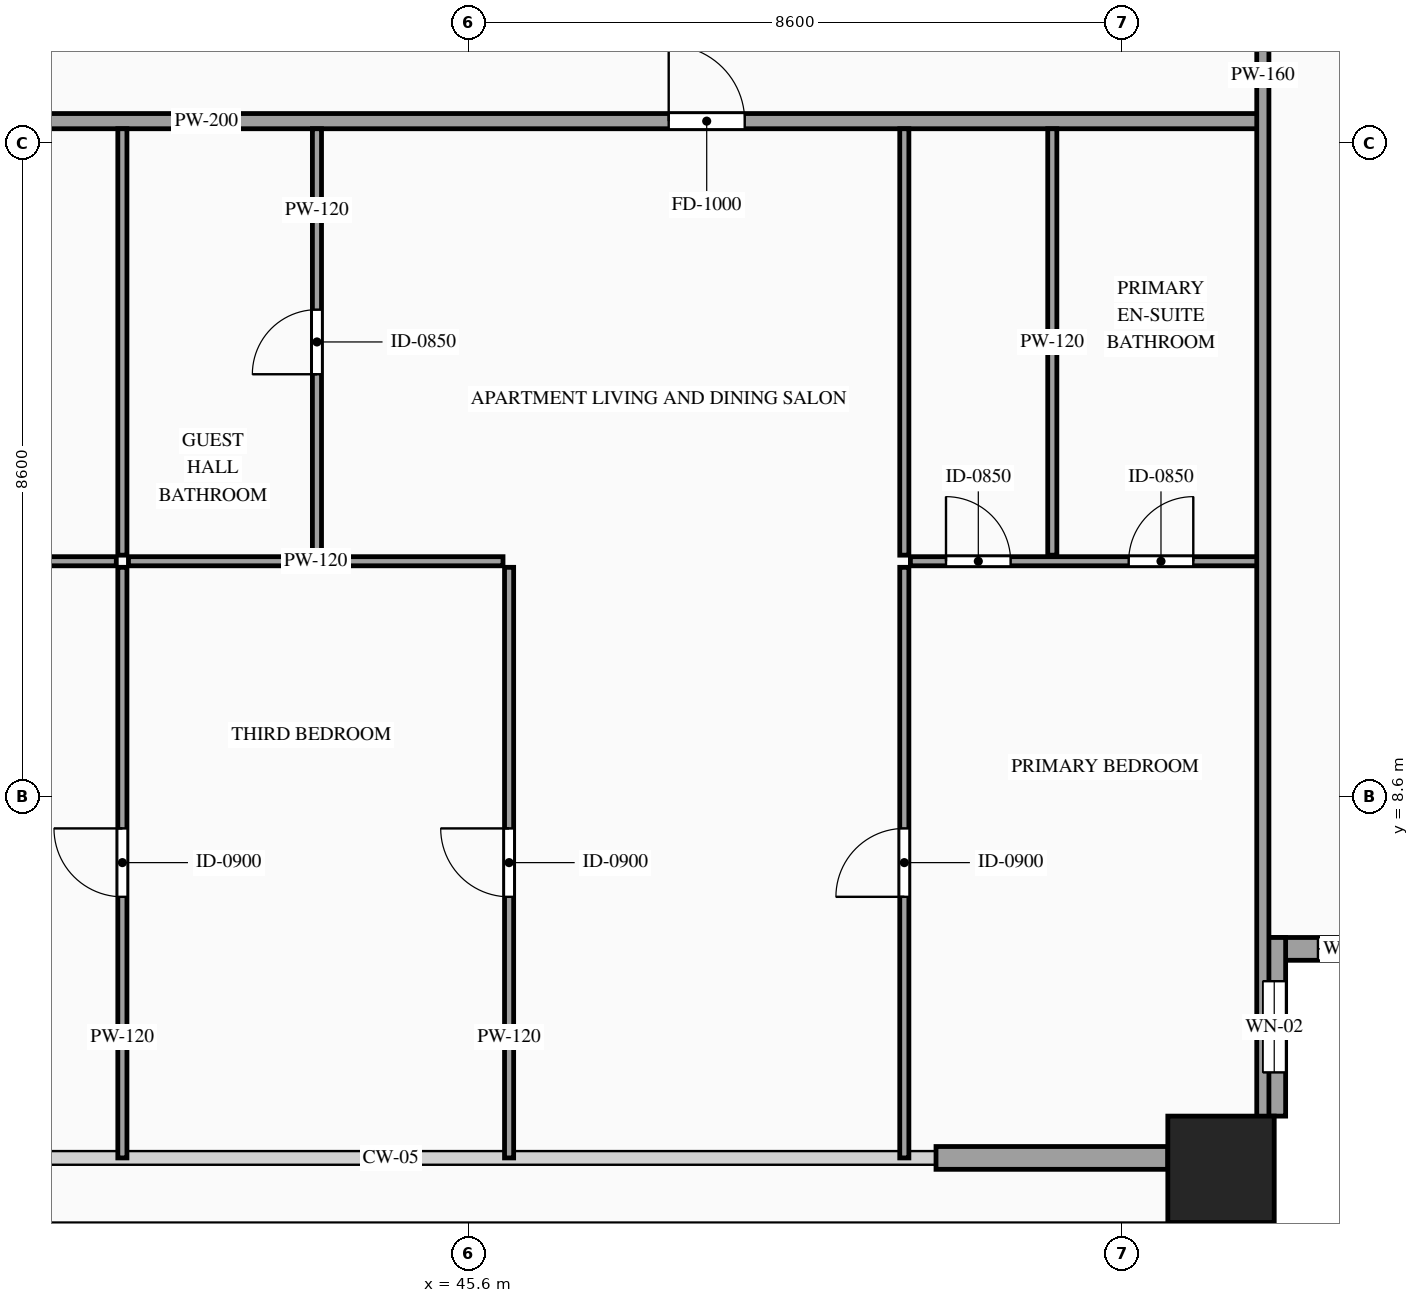
"""IFC4 building model, lengths in metres.
Left out: names, types, materials, properties, quantities, classifications, styles, units other than length and angle.
Written with IfcOpenShell. Run it as: python <this file> out.ifc"""

import sys

from ifc_helpers import new_model, si_unit, direction, frame, frame_2d, origin, origin_2d, place, context, subcontext, project, spatial, rectangle, hollow_rectangle, extrude, source, transform, mapped, element, fill, save


model = new_model("IFC4")
c1 = context("Model", 3, precision=1e-05, world=origin(), true_north=direction((0.0, 1.0)))
c2 = subcontext(c1, "Body", "Model", "MODEL_VIEW")
j1 = project(units=[si_unit("LENGTHUNIT", "METRE"), si_unit("PLANEANGLEUNIT", "RADIAN")], contexts=[c1])
p1 = place(None, origin())
s1 = spatial("IfcSite", under=j1, at=p1, CompositionType="ELEMENT")
p2 = place(p1, origin())
s2 = spatial("IfcBuilding", under=s1, at=p2, CompositionType="ELEMENT")
p3 = place(p2, frame((0.0, 0.0, 195.0)))
s3 = spatial("IfcBuildingStorey", under=s2, at=p3, CompositionType="ELEMENT", Elevation=195.0)
m1 = source(origin(), c2, "Body", "SweptSolid", [
    extrude(hollow_rectangle(XDim=1.4, YDim=1.4, WallThickness=0.06, at=origin_2d()), origin(), (0.0, 0.0, 1.0), 3.5),
])
p4 = place(p3, frame((55.5, 3.7, 0.0), z_axis=(0.0, 0.0, 1.0), x_axis=(1.0, 0.0, 0.0)))
e1 = element("IfcColumn", 1, at=p4, inside=s3, PredefinedType="COLUMN", context=c2, shape_type="MappedRepresentation", body=[
    mapped(m1, transform((0.0, 0.0, 0.0), scale=1.0)),
])
p5 = place(p3, frame((56.05, 6.6, 0.0), z_axis=(0.0, 0.0, 1.0), x_axis=(1.0, 0.0, 0.0)))
e2 = element("IfcWall", 2, at=p5, inside=s3, PredefinedType="SOLIDWALL", context=c2, shape_type="SweptSolid", body=[
    extrude(rectangle(XDim=2.35, YDim=0.3, at=frame_2d((1.175, 0.0))), origin(), (0.0, 0.0, 1.0), 3.28),
])
p6 = place(p5, frame((0.725, 0.0, 0.85)))
e3 = element("IfcOpeningElement", 3, at=p6, cuts=e2, PredefinedType="OPENING", context=c2, shape_type="SweptSolid", body=[
    extrude(rectangle(XDim=0.9, YDim=1.5, at=frame_2d((0.45, 0.75))), frame((0.0, 0.165, 0.0), z_axis=(0.0, -1.0, 0.0), x_axis=(1.0, 0.0, 0.0)), (0.0, 0.0, 1.0), 0.33),
])
p7 = place(p3, frame((56.2, 4.4, 0.0), z_axis=(0.0, 0.0, 1.0), x_axis=(0.0, 1.0, 0.0)))
e4 = element("IfcWall", 4, at=p7, inside=s3, PredefinedType="SOLIDWALL", context=c2, shape_type="SweptSolid", body=[
    extrude(rectangle(XDim=2.35, YDim=0.3, at=frame_2d((1.175, 0.0))), origin(), (0.0, 0.0, 1.0), 3.28),
])
p8 = place(p7, frame((0.575, 0.0, 0.85)))
e5 = element("IfcOpeningElement", 5, at=p8, cuts=e4, PredefinedType="OPENING", context=c2, shape_type="SweptSolid", body=[
    extrude(rectangle(XDim=1.2, YDim=2.1, at=frame_2d((0.6, 1.05))), frame((0.0, 0.165, 0.0), z_axis=(0.0, -1.0, 0.0), x_axis=(1.0, 0.0, 0.0)), (0.0, 0.0, 1.0), 0.33),
])
m2 = source(origin(), c2, "Body", "SweptSolid", [
    extrude(rectangle(XDim=3.05, YDim=0.3, at=frame_2d((1.525, 0.0))), origin(), (0.0, 0.0, 1.0), 2.835),
])
p9 = place(p3, frame((51.75, 3.85, 0.0), z_axis=(0.0, 0.0, 1.0), x_axis=(1.0, 0.0, 0.0)))
e6 = element("IfcWall", 6, at=p9, inside=s3, PredefinedType="SOLIDWALL", context=c2, shape_type="MappedRepresentation", body=[
    mapped(m2, transform((0.0, 0.0, 0.0), scale=1.0)),
])
p10 = place(p3, frame((36.318, 17.49, 0.0), z_axis=(0.0, 0.0, 1.0), x_axis=(1.0, 0.0, 0.0)))
e7 = element("IfcWall", 7, at=p10, inside=s3, PredefinedType="PARTITIONING", context=c2, shape_type="SweptSolid", body=[
    extrude(rectangle(XDim=19.742, YDim=0.2, at=frame_2d((9.871, 0.0))), origin(), (0.0, 0.0, 1.0), 3.28),
])
p11 = place(p10, frame((11.915, 0.0, 0.0)))
e8 = element("IfcOpeningElement", 8, at=p11, cuts=e7, PredefinedType="OPENING", context=c2, shape_type="SweptSolid", body=[
    extrude(rectangle(XDim=1.0, YDim=2.2, at=frame_2d((0.5, 1.1))), frame((0.0, 0.115, 0.0), z_axis=(0.0, -1.0, 0.0), x_axis=(1.0, 0.0, 0.0)), (0.0, 0.0, 1.0), 0.23),
])
p12 = place(p3, frame((36.318, 11.7, 0.0), z_axis=(0.0, 0.0, 1.0), x_axis=(1.0, 0.0, 0.0)))
e9 = element("IfcWall", 9, at=p12, inside=s3, PredefinedType="PARTITIONING", context=c2, shape_type="SweptSolid", body=[
    extrude(rectangle(XDim=4.647, YDim=0.12, at=frame_2d((2.323, 0.0))), origin(), (0.0, 0.0, 1.0), 2.875),
])
p13 = place(p12, frame((1.898, 0.0, 0.0)))
e10 = element("IfcOpeningElement", 10, at=p13, cuts=e9, PredefinedType="OPENING", context=c2, shape_type="SweptSolid", body=[
    extrude(rectangle(XDim=0.85, YDim=2.1, at=frame_2d((0.425, 1.05))), frame((0.0, 0.075, 0.0), z_axis=(0.0, -1.0, 0.0), x_axis=(1.0, 0.0, 0.0)), (0.0, 0.0, 1.0), 0.15),
])
m3 = source(origin(), c2, "Body", "SweptSolid", [
    extrude(rectangle(XDim=5.61, YDim=0.12, at=frame_2d((2.805, 0.0))), origin(), (0.0, 0.0, 1.0), 3.28),
])
p14 = place(p3, frame((41.045, 11.78, 0.0), z_axis=(0.0, 0.0, 1.0), x_axis=(0.0, 1.0, 0.0)))
e11 = element("IfcWall", 11, at=p14, inside=s3, PredefinedType="PARTITIONING", context=c2, shape_type="MappedRepresentation", body=[
    mapped(m3, transform((0.0, 0.0, 0.0), scale=1.0)),
])
p15 = place(p3, frame((43.605, 11.78, 0.0), z_axis=(0.0, 0.0, 1.0), x_axis=(0.0, 1.0, 0.0)))
e12 = element("IfcWall", 12, at=p15, inside=s3, PredefinedType="PARTITIONING", context=c2, shape_type="SweptSolid", body=[
    extrude(rectangle(XDim=5.61, YDim=0.12, at=frame_2d((2.805, 0.0))), origin(), (0.0, 0.0, 1.0), 3.28),
])
p16 = place(p15, frame((2.38, 0.0, 0.0)))
e13 = element("IfcOpeningElement", 13, at=p16, cuts=e12, PredefinedType="OPENING", context=c2, shape_type="SweptSolid", body=[
    extrude(rectangle(XDim=0.85, YDim=2.1, at=frame_2d((0.425, 1.05))), frame((0.0, 0.075, 0.0), z_axis=(0.0, -1.0, 0.0), x_axis=(1.0, 0.0, 0.0)), (0.0, 0.0, 1.0), 0.15),
])
for number, where, z_axis, x_axis in (
    (14, (53.28, 11.78, 0.0), (0.0, 0.0, 1.0), (0.0, 1.0, 0.0)),
    (15, (51.333, 11.78, 0.0), (0.0, 0.0, 1.0), (0.0, 1.0, 0.0)),
):
    element("IfcWall", number, at=place(p3, frame(where, z_axis=z_axis, x_axis=x_axis)), inside=s3, PredefinedType="PARTITIONING", context=c2, shape_type="MappedRepresentation", body=[
        mapped(m3, transform((0.0, 0.0, 0.0), scale=1.0)),
    ])
p17 = place(p3, frame((41.045, 3.85, 0.0), z_axis=(0.0, 0.0, 1.0), x_axis=(0.0, 1.0, 0.0)))
e16 = element("IfcWall", 16, at=p17, inside=s3, PredefinedType="PARTITIONING", context=c2, shape_type="SweptSolid", body=[
    extrude(rectangle(XDim=7.77, YDim=0.12, at=frame_2d((3.885, 0.0))), origin(), (0.0, 0.0, 1.0), 3.28),
])
p18 = place(p17, frame((3.435, 0.0, 0.0)))
e17 = element("IfcOpeningElement", 17, at=p18, cuts=e16, PredefinedType="OPENING", context=c2, shape_type="SweptSolid", body=[
    extrude(rectangle(XDim=0.9, YDim=2.15, at=frame_2d((0.45, 1.075))), frame((0.0, 0.075, 0.0), z_axis=(0.0, -1.0, 0.0), x_axis=(1.0, 0.0, 0.0)), (0.0, 0.0, 1.0), 0.15),
])
p19 = place(p3, frame((51.413, 11.7, 0.0), z_axis=(0.0, 0.0, 1.0), x_axis=(1.0, 0.0, 0.0)))
e18 = element("IfcWall", 18, at=p19, inside=s3, PredefinedType="PARTITIONING", context=c2, shape_type="SweptSolid", body=[
    extrude(rectangle(XDim=4.647, YDim=0.12, at=frame_2d((2.323, 0.0))), origin(), (0.0, 0.0, 1.0), 3.28),
])
p20 = place(p19, frame((2.872, 0.0, 0.0)))
e19 = element("IfcOpeningElement", 19, at=p20, cuts=e18, PredefinedType="OPENING", context=c2, shape_type="SweptSolid", body=[
    extrude(rectangle(XDim=0.85, YDim=2.1, at=frame_2d((0.425, 1.05))), frame((0.0, 0.075, 0.0), z_axis=(0.0, -1.0, 0.0), x_axis=(1.0, 0.0, 0.0)), (0.0, 0.0, 1.0), 0.15),
])
p21 = place(p19, frame((0.469, 0.0, 0.0)))
e20 = element("IfcOpeningElement", 20, at=p21, cuts=e18, PredefinedType="OPENING", context=c2, shape_type="SweptSolid", body=[
    extrude(rectangle(XDim=0.85, YDim=2.1, at=frame_2d((0.425, 1.05))), frame((0.0, 0.075, 0.0), z_axis=(0.0, -1.0, 0.0), x_axis=(1.0, 0.0, 0.0)), (0.0, 0.0, 1.0), 0.15),
])
p22 = place(p3, frame((51.333, 3.85, 0.0), z_axis=(0.0, 0.0, 1.0), x_axis=(0.0, 1.0, 0.0)))
e21 = element("IfcWall", 21, at=p22, inside=s3, PredefinedType="PARTITIONING", context=c2, shape_type="SweptSolid", body=[
    extrude(rectangle(XDim=7.77, YDim=0.12, at=frame_2d((3.885, 0.0))), origin(), (0.0, 0.0, 1.0), 3.28),
])
p23 = place(p22, frame((3.435, 0.0, 0.0)))
e22 = element("IfcOpeningElement", 22, at=p23, cuts=e21, PredefinedType="OPENING", context=c2, shape_type="SweptSolid", body=[
    extrude(rectangle(XDim=0.9, YDim=2.15, at=frame_2d((0.45, 1.075))), frame((0.0, 0.075, 0.0), z_axis=(0.0, -1.0, 0.0), x_axis=(1.0, 0.0, 0.0)), (0.0, 0.0, 1.0), 0.15),
])
m4 = source(origin(), c2, "Body", "SweptSolid", [
    extrude(rectangle(XDim=4.928, YDim=0.12, at=frame_2d((2.464, 0.0))), origin(), (0.0, 0.0, 1.0), 2.875),
])
p24 = place(p3, frame((41.125, 11.7, 0.0), z_axis=(0.0, 0.0, 1.0), x_axis=(1.0, 0.0, 0.0)))
e23 = element("IfcWall", 23, at=p24, inside=s3, PredefinedType="PARTITIONING", context=c2, shape_type="MappedRepresentation", body=[
    mapped(m4, transform((0.0, 0.0, 0.0), scale=1.0)),
])
p25 = place(p3, frame((46.133, 3.85, 0.0), z_axis=(0.0, 0.0, 1.0), x_axis=(0.0, 1.0, 0.0)))
e24 = element("IfcWall", 24, at=p25, inside=s3, PredefinedType="PARTITIONING", context=c2, shape_type="SweptSolid", body=[
    extrude(rectangle(XDim=7.77, YDim=0.12, at=frame_2d((3.885, 0.0))), origin(), (0.0, 0.0, 1.0), 3.28),
])
p26 = place(p25, frame((3.435, 0.0, 0.0)))
e25 = element("IfcOpeningElement", 25, at=p26, cuts=e24, PredefinedType="OPENING", context=c2, shape_type="SweptSolid", body=[
    extrude(rectangle(XDim=0.9, YDim=2.15, at=frame_2d((0.45, 1.075))), frame((0.0, 0.075, 0.0), z_axis=(0.0, -1.0, 0.0), x_axis=(1.0, 0.0, 0.0)), (0.0, 0.0, 1.0), 0.15),
])
m5 = source(origin(), c2, "Body", "SweptSolid", [
    extrude(rectangle(XDim=28.19, YDim=0.16, at=frame_2d((14.095, 0.0))), origin(), (0.0, 0.0, 1.0), 3.28),
])
p27 = place(p3, frame((56.05, 4.0, 0.0), z_axis=(0.0, 0.0, 1.0), x_axis=(0.0, 1.0, 0.0)))
e26 = element("IfcWall", 26, at=p27, inside=s3, PredefinedType="PARTITIONING", context=c2, shape_type="MappedRepresentation", body=[
    mapped(m5, transform((0.0, 0.0, 0.0), scale=1.0)),
])
m6 = source(origin(), c2, "Body", "SweptSolid", [
    extrude(rectangle(XDim=0.9, YDim=1.5, at=frame_2d((0.45, 0.75))), frame((0.0, 0.03, 0.0), z_axis=(0.0, -1.0, 0.0), x_axis=(1.0, 0.0, 0.0)), (0.0, 0.0, 1.0), 0.06),
])
p28 = place(p6, origin())
e27 = element("IfcWindow", 27, at=p28, inside=s3, PartitioningType="SINGLE_PANEL", PredefinedType="WINDOW", context=c2, shape_type="MappedRepresentation", body=[
    mapped(m6, transform((0.0, 0.0, 0.0), scale=1.0)),
])
fill(e3, e27)
m7 = source(origin(), c2, "Body", "SweptSolid", [
    extrude(rectangle(XDim=1.2, YDim=2.1, at=frame_2d((0.6, 1.05))), frame((0.0, 0.03, 0.0), z_axis=(0.0, -1.0, 0.0), x_axis=(1.0, 0.0, 0.0)), (0.0, 0.0, 1.0), 0.06),
])
p29 = place(p8, origin())
e28 = element("IfcWindow", 28, at=p29, inside=s3, PartitioningType="SINGLE_PANEL", PredefinedType="WINDOW", context=c2, shape_type="MappedRepresentation", body=[
    mapped(m7, transform((0.0, 0.0, 0.0), scale=1.0)),
])
fill(e5, e28)
m8 = source(origin(), c2, "Body", "SweptSolid", [
    extrude(rectangle(XDim=1.0, YDim=2.2, at=frame_2d((0.5, 1.1))), frame((0.0, 0.025, 0.0), z_axis=(0.0, -1.0, 0.0), x_axis=(1.0, 0.0, 0.0)), (0.0, 0.0, 1.0), 0.05),
])
p30 = place(p11, origin())
e29 = element("IfcDoor", 29, at=p30, inside=s3, OperationType="SINGLE_SWING_LEFT", PredefinedType="DOOR", context=c2, shape_type="MappedRepresentation", body=[
    mapped(m8, transform((0.0, 0.0, 0.0), scale=1.0)),
])
fill(e8, e29)
m9 = source(origin(), c2, "Body", "SweptSolid", [
    extrude(rectangle(XDim=0.85, YDim=2.1, at=frame_2d((0.425, 1.05))), frame((0.0, 0.025, 0.0), z_axis=(0.0, -1.0, 0.0), x_axis=(1.0, 0.0, 0.0)), (0.0, 0.0, 1.0), 0.05),
])
p31 = place(p16, origin())
e30 = element("IfcDoor", 30, at=p31, inside=s3, OperationType="SINGLE_SWING_LEFT", PredefinedType="DOOR", context=c2, shape_type="MappedRepresentation", body=[
    mapped(m9, transform((0.0, 0.0, 0.0), scale=1.0)),
])
fill(e13, e30)
p32 = place(p20, origin())
e31 = element("IfcDoor", 31, at=p32, inside=s3, OperationType="SINGLE_SWING_RIGHT", PredefinedType="DOOR", context=c2, shape_type="MappedRepresentation", body=[
    mapped(m9, transform((0.0, 0.0, 0.0), scale=1.0)),
])
fill(e19, e31)
p33 = place(p21, origin())
e32 = element("IfcDoor", 32, at=p33, inside=s3, OperationType="SINGLE_SWING_LEFT", PredefinedType="DOOR", context=c2, shape_type="MappedRepresentation", body=[
    mapped(m9, transform((0.0, 0.0, 0.0), scale=1.0)),
])
fill(e20, e32)
m10 = source(origin(), c2, "Body", "SweptSolid", [
    extrude(rectangle(XDim=0.9, YDim=2.15, at=frame_2d((0.45, 1.075))), frame((0.0, 0.025, 0.0), z_axis=(0.0, -1.0, 0.0), x_axis=(1.0, 0.0, 0.0)), (0.0, 0.0, 1.0), 0.05),
])
p34 = place(p18, origin())
e33 = element("IfcDoor", 33, at=p34, inside=s3, OperationType="SINGLE_SWING_RIGHT", PredefinedType="DOOR", context=c2, shape_type="MappedRepresentation", body=[
    mapped(m10, transform((0.0, 0.0, 0.0), scale=1.0)),
])
fill(e17, e33)
p35 = place(p23, origin())
e34 = element("IfcDoor", 34, at=p35, inside=s3, OperationType="SINGLE_SWING_LEFT", PredefinedType="DOOR", context=c2, shape_type="MappedRepresentation", body=[
    mapped(m10, transform((0.0, 0.0, 0.0), scale=1.0)),
])
fill(e22, e34)
p36 = place(p26, origin())
e35 = element("IfcDoor", 35, at=p36, inside=s3, OperationType="SINGLE_SWING_RIGHT", PredefinedType="DOOR", context=c2, shape_type="MappedRepresentation", body=[
    mapped(m10, transform((0.0, 0.0, 0.0), scale=1.0)),
])
fill(e25, e35)
save(model, sys.argv[1])
